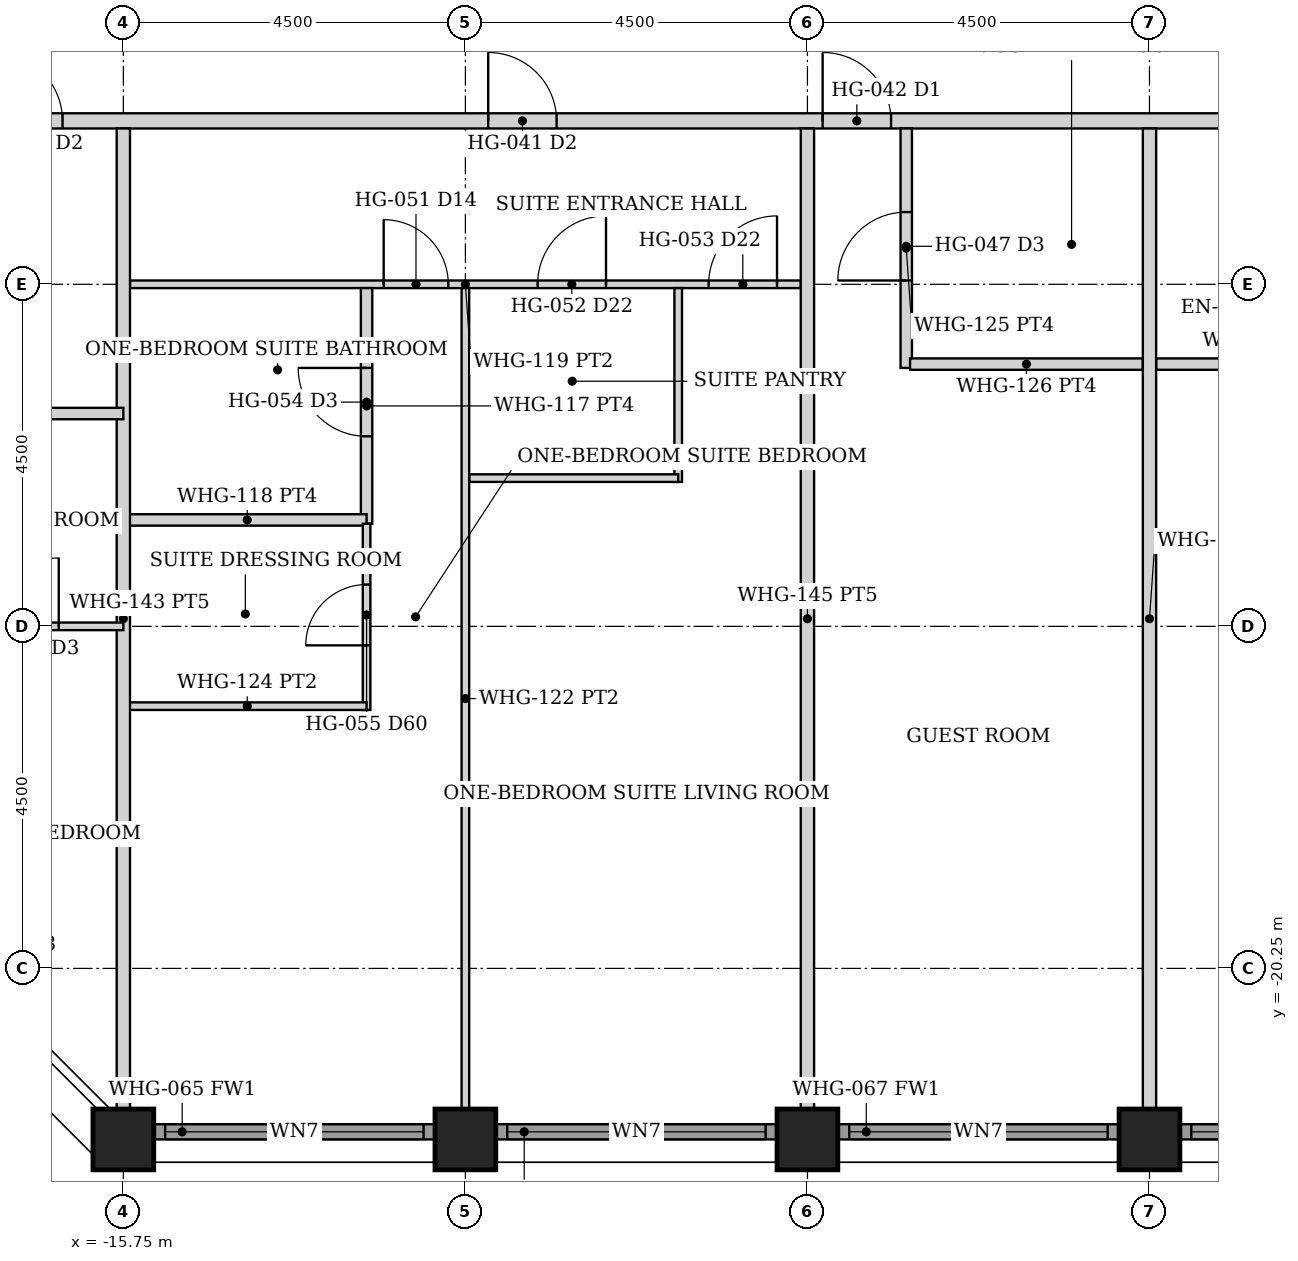
"""IFC4 building model, lengths in metres.
Left out: names, types, materials, properties, quantities, classifications, styles, units other than length and angle.
Written with IfcOpenShell. Run it as: python <this file> out.ifc"""

import sys

from ifc_helpers import new_model, si_unit, direction, frame, frame_2d, origin, origin_2d, place, context, subcontext, project, spatial, rectangle, hollow_rectangle, extrude, element, fill, save


model = new_model("IFC4")
c1 = context("Model", 3, precision=1e-05, world=origin(), true_north=direction((0.0, 1.0)))
c2 = subcontext(c1, "Body", "Model", "MODEL_VIEW")
j1 = project(units=[si_unit("LENGTHUNIT", "METRE"), si_unit("PLANEANGLEUNIT", "RADIAN")], contexts=[c1])
p1 = place(None, origin())
s1 = spatial("IfcSite", under=j1, at=p1, CompositionType="ELEMENT")
p2 = place(p1, origin())
s2 = spatial("IfcBuilding", under=s1, at=p2, CompositionType="ELEMENT")
p3 = place(p2, frame((0.0, 0.0, 186.8)))
s3 = spatial("IfcBuildingStorey", under=s2, at=p3, CompositionType="ELEMENT", Elevation=186.8)
for number, where, z_axis, x_axis in (
    (1, (-15.75, -22.5, 0.0), (0.0, 0.0, 1.0), (0.0, 1.0, 0.0)),
    (2, (-11.25, -22.5, 0.0), (0.0, 0.0, 1.0), (0.0, 1.0, 0.0)),
    (3, (-6.75, -22.5, 0.0), (0.0, 0.0, 1.0), (0.0, 1.0, 0.0)),
    (4, (-2.25, -22.5, 0.0), (0.0, 0.0, 1.0), (0.0, 1.0, 0.0)),
):
    element("IfcColumn", number, at=place(p3, frame(where, z_axis=z_axis, x_axis=x_axis)), inside=s3, PredefinedType="COLUMN", context=c2, shape_type="SweptSolid", body=[
        extrude(hollow_rectangle(XDim=0.8, YDim=0.8, WallThickness=0.045, at=origin_2d()), origin(), (0.0, 0.0, 1.0), 3.6),
    ])
p4 = place(p3, frame((-15.345, -22.4, 0.0), z_axis=(0.0, 0.0, 1.0), x_axis=(1.0, 0.0, 0.0)))
e5 = element("IfcWall", 5, at=p4, inside=s3, PredefinedType="SOLIDWALL", context=c2, shape_type="SweptSolid", body=[
    extrude(rectangle(XDim=3.69, YDim=0.2, at=frame_2d((1.845, 0.0))), origin(), (0.0, 0.0, 1.0), 2.379),
])
p5 = place(p4, frame((0.145, 0.0, 0.3)))
e6 = element("IfcOpeningElement", 6, at=p5, cuts=e5, PredefinedType="OPENING", context=c2, shape_type="SweptSolid", body=[
    extrude(rectangle(XDim=3.4, YDim=1.929, at=frame_2d((1.7, 0.964))), frame((0.0, 0.11, 0.0), z_axis=(0.0, -1.0, 0.0), x_axis=(1.0, 0.0, 0.0)), (0.0, 0.0, 1.0), 0.22),
])
p6 = place(p3, frame((-10.845, -22.4, 0.0), z_axis=(0.0, 0.0, 1.0), x_axis=(1.0, 0.0, 0.0)))
e7 = element("IfcWall", 7, at=p6, inside=s3, PredefinedType="SOLIDWALL", context=c2, shape_type="SweptSolid", body=[
    extrude(rectangle(XDim=3.69, YDim=0.2, at=frame_2d((1.845, 0.0))), origin(), (0.0, 0.0, 1.0), 2.379),
])
p7 = place(p6, frame((0.145, 0.0, 0.3)))
e8 = element("IfcOpeningElement", 8, at=p7, cuts=e7, PredefinedType="OPENING", context=c2, shape_type="SweptSolid", body=[
    extrude(rectangle(XDim=3.4, YDim=1.929, at=frame_2d((1.7, 0.964))), frame((0.0, 0.11, 0.0), z_axis=(0.0, -1.0, 0.0), x_axis=(1.0, 0.0, 0.0)), (0.0, 0.0, 1.0), 0.22),
])
p8 = place(p3, frame((-6.345, -22.4, 0.0), z_axis=(0.0, 0.0, 1.0), x_axis=(1.0, 0.0, 0.0)))
e9 = element("IfcWall", 9, at=p8, inside=s3, PredefinedType="SOLIDWALL", context=c2, shape_type="SweptSolid", body=[
    extrude(rectangle(XDim=3.69, YDim=0.2, at=frame_2d((1.845, 0.0))), origin(), (0.0, 0.0, 1.0), 2.379),
])
p9 = place(p8, frame((0.145, 0.0, 0.3)))
e10 = element("IfcOpeningElement", 10, at=p9, cuts=e9, PredefinedType="OPENING", context=c2, shape_type="SweptSolid", body=[
    extrude(rectangle(XDim=3.4, YDim=1.929, at=frame_2d((1.7, 0.964))), frame((0.0, 0.11, 0.0), z_axis=(0.0, -1.0, 0.0), x_axis=(1.0, 0.0, 0.0)), (0.0, 0.0, 1.0), 0.22),
])
p10 = place(p3, frame((-1.845, -22.4, 0.0), z_axis=(0.0, 0.0, 1.0), x_axis=(1.0, 0.0, 0.0)))
e11 = element("IfcWall", 11, at=p10, inside=s3, PredefinedType="SOLIDWALL", context=c2, shape_type="SweptSolid", body=[
    extrude(rectangle(XDim=3.69, YDim=0.2, at=frame_2d((1.845, 0.0))), origin(), (0.0, 0.0, 1.0), 2.379),
])
p11 = place(p10, frame((0.145, 0.0, 0.3)))
e12 = element("IfcOpeningElement", 12, at=p11, cuts=e11, PredefinedType="OPENING", context=c2, shape_type="SweptSolid", body=[
    extrude(rectangle(XDim=3.4, YDim=1.929, at=frame_2d((1.7, 0.964))), frame((0.0, 0.11, 0.0), z_axis=(0.0, -1.0, 0.0), x_axis=(1.0, 0.0, 0.0)), (0.0, 0.0, 1.0), 0.22),
])
p12 = place(p3, frame((-22.3, -9.1, 0.0), z_axis=(0.0, 0.0, 1.0), x_axis=(1.0, 0.0, 0.0)))
e13 = element("IfcWall", 13, at=p12, inside=s3, PredefinedType="PARTITIONING", context=c2, shape_type="SweptSolid", body=[
    extrude(rectangle(XDim=44.6, YDim=0.2, at=frame_2d((22.3, 0.0))), origin(), (0.0, 0.0, 1.0), 2.379),
])
p13 = place(p12, frame((11.35, 0.0, 0.0)))
e14 = element("IfcOpeningElement", 14, at=p13, cuts=e13, PredefinedType="OPENING", context=c2, shape_type="SweptSolid", body=[
    extrude(rectangle(XDim=0.9, YDim=2.1, at=frame_2d((0.45, 1.05))), frame((0.0, 0.11, 0.0), z_axis=(0.0, -1.0, 0.0), x_axis=(1.0, 0.0, 0.0)), (0.0, 0.0, 1.0), 0.22),
])
p14 = place(p12, frame((15.75, 0.0, 0.0)))
e15 = element("IfcOpeningElement", 15, at=p14, cuts=e13, PredefinedType="OPENING", context=c2, shape_type="SweptSolid", body=[
    extrude(rectangle(XDim=0.9, YDim=2.1, at=frame_2d((0.45, 1.05))), frame((0.0, 0.11, 0.0), z_axis=(0.0, -1.0, 0.0), x_axis=(1.0, 0.0, 0.0)), (0.0, 0.0, 1.0), 0.22),
])
p15 = place(p12, frame((23.45, 0.0, 0.0)))
e16 = element("IfcOpeningElement", 16, at=p15, cuts=e13, PredefinedType="OPENING", context=c2, shape_type="SweptSolid", body=[
    extrude(rectangle(XDim=0.9, YDim=2.1, at=frame_2d((0.45, 1.05))), frame((0.0, 0.11, 0.0), z_axis=(0.0, -1.0, 0.0), x_axis=(1.0, 0.0, 0.0)), (0.0, 0.0, 1.0), 0.22),
])
p16 = place(p12, frame((24.75, 0.0, 0.0)))
e17 = element("IfcOpeningElement", 17, at=p16, cuts=e13, PredefinedType="OPENING", context=c2, shape_type="SweptSolid", body=[
    extrude(rectangle(XDim=0.9, YDim=2.1, at=frame_2d((0.45, 1.05))), frame((0.0, 0.11, 0.0), z_axis=(0.0, -1.0, 0.0), x_axis=(1.0, 0.0, 0.0)), (0.0, 0.0, 1.0), 0.22),
])
p17 = place(p12, frame((29.25, 0.0, 0.0)))
e18 = element("IfcOpeningElement", 18, at=p17, cuts=e13, PredefinedType="OPENING", context=c2, shape_type="SweptSolid", body=[
    extrude(rectangle(XDim=0.9, YDim=2.1, at=frame_2d((0.45, 1.05))), frame((0.0, 0.11, 0.0), z_axis=(0.0, -1.0, 0.0), x_axis=(1.0, 0.0, 0.0)), (0.0, 0.0, 1.0), 0.22),
])
p18 = place(p12, frame((38.85, 0.0, 0.0)))
e19 = element("IfcOpeningElement", 19, at=p18, cuts=e13, PredefinedType="OPENING", context=c2, shape_type="SweptSolid", body=[
    extrude(rectangle(XDim=0.9, YDim=2.1, at=frame_2d((0.45, 1.05))), frame((0.0, 0.11, 0.0), z_axis=(0.0, -1.0, 0.0), x_axis=(1.0, 0.0, 0.0)), (0.0, 0.0, 1.0), 0.22),
])
p19 = place(p12, frame((4.85, 0.0, 0.0)))
e20 = element("IfcOpeningElement", 20, at=p19, cuts=e13, PredefinedType="OPENING", context=c2, shape_type="SweptSolid", body=[
    extrude(rectangle(XDim=0.9, YDim=2.1, at=frame_2d((0.45, 1.05))), frame((0.0, 0.11, 0.0), z_axis=(0.0, -1.0, 0.0), x_axis=(1.0, 0.0, 0.0)), (0.0, 0.0, 1.0), 0.22),
])
p20 = place(p3, frame((-15.663, -11.25, 0.0), z_axis=(0.0, 0.0, 1.0), x_axis=(1.0, 0.0, 0.0)))
e21 = element("IfcWall", 21, at=p20, inside=s3, PredefinedType="PARTITIONING", context=c2, shape_type="SweptSolid", body=[
    extrude(rectangle(XDim=8.825, YDim=0.1, at=frame_2d((4.413, 0.0))), origin(), (0.0, 0.0, 1.0), 2.379),
])
p21 = place(p20, frame((5.363, 0.0, 0.0)))
e22 = element("IfcOpeningElement", 22, at=p21, cuts=e21, PredefinedType="OPENING", context=c2, shape_type="SweptSolid", body=[
    extrude(rectangle(XDim=0.9, YDim=2.1, at=frame_2d((0.45, 1.05))), frame((0.0, 0.06, 0.0), z_axis=(0.0, -1.0, 0.0), x_axis=(1.0, 0.0, 0.0)), (0.0, 0.0, 1.0), 0.12),
])
p22 = place(p20, frame((7.613, 0.0, 0.0)))
e23 = element("IfcOpeningElement", 23, at=p22, cuts=e21, PredefinedType="OPENING", context=c2, shape_type="SweptSolid", body=[
    extrude(rectangle(XDim=0.9, YDim=2.1, at=frame_2d((0.45, 1.05))), frame((0.0, 0.06, 0.0), z_axis=(0.0, -1.0, 0.0), x_axis=(1.0, 0.0, 0.0)), (0.0, 0.0, 1.0), 0.12),
])
p23 = place(p20, frame((3.337, 0.0, 0.0)))
e24 = element("IfcOpeningElement", 24, at=p23, cuts=e21, PredefinedType="OPENING", context=c2, shape_type="SweptSolid", body=[
    extrude(rectangle(XDim=0.85, YDim=2.1, at=frame_2d((0.425, 1.05))), frame((0.0, 0.06, 0.0), z_axis=(0.0, -1.0, 0.0), x_axis=(1.0, 0.0, 0.0)), (0.0, 0.0, 1.0), 0.12),
])
p24 = place(p3, frame((-8.45, -13.85, 0.0), z_axis=(0.0, 0.0, 1.0), x_axis=(0.0, 1.0, 0.0)))
e25 = element("IfcWall", 25, at=p24, inside=s3, PredefinedType="PARTITIONING", context=c2, shape_type="SweptSolid", body=[
    extrude(rectangle(XDim=2.55, YDim=0.1, at=frame_2d((1.275, 0.0))), origin(), (0.0, 0.0, 1.0), 2.379),
])
p25 = place(p3, frame((-11.2, -13.8, 0.0), z_axis=(0.0, 0.0, 1.0), x_axis=(1.0, 0.0, 0.0)))
e26 = element("IfcWall", 26, at=p25, inside=s3, PredefinedType="PARTITIONING", context=c2, shape_type="SweptSolid", body=[
    extrude(rectangle(XDim=2.75, YDim=0.1, at=frame_2d((1.375, 0.0))), origin(), (0.0, 0.0, 1.0), 2.379),
])
p26 = place(p3, frame((-11.25, -22.1, 0.0), z_axis=(0.0, 0.0, 1.0), x_axis=(0.0, 1.0, 0.0)))
e27 = element("IfcWall", 27, at=p26, inside=s3, PredefinedType="PARTITIONING", context=c2, shape_type="SweptSolid", body=[
    extrude(rectangle(XDim=10.8, YDim=0.1, at=frame_2d((5.4, 0.0))), origin(), (0.0, 0.0, 1.0), 2.379),
])
p27 = place(p3, frame((-12.55, -14.4, 0.0), z_axis=(0.0, 0.0, 1.0), x_axis=(0.0, 1.0, 0.0)))
e28 = element("IfcWall", 28, at=p27, inside=s3, PredefinedType="PARTITIONING", context=c2, shape_type="SweptSolid", body=[
    extrude(rectangle(XDim=3.1, YDim=0.15, at=frame_2d((1.55, 0.0))), origin(), (0.0, 0.0, 1.0), 2.379),
])
p28 = place(p27, frame((1.15, 0.0, 0.0)))
e29 = element("IfcOpeningElement", 29, at=p28, cuts=e28, PredefinedType="OPENING", context=c2, shape_type="SweptSolid", body=[
    extrude(rectangle(XDim=0.9, YDim=2.1, at=frame_2d((0.45, 1.05))), frame((0.0, 0.085, 0.0), z_axis=(0.0, -1.0, 0.0), x_axis=(1.0, 0.0, 0.0)), (0.0, 0.0, 1.0), 0.17),
])
p29 = place(p3, frame((-15.69, -14.35, 0.0), z_axis=(0.0, 0.0, 1.0), x_axis=(1.0, 0.0, 0.0)))
e30 = element("IfcWall", 30, at=p29, inside=s3, PredefinedType="PARTITIONING", context=c2, shape_type="SweptSolid", body=[
    extrude(rectangle(XDim=3.14, YDim=0.15, at=frame_2d((1.57, 0.0))), origin(), (0.0, 0.0, 1.0), 2.379),
])
p30 = place(p3, frame((-12.55, -16.85, 0.0), z_axis=(0.0, 0.0, 1.0), x_axis=(0.0, 1.0, 0.0)))
e31 = element("IfcWall", 31, at=p30, inside=s3, PredefinedType="PARTITIONING", context=c2, shape_type="SweptSolid", body=[
    extrude(rectangle(XDim=2.45, YDim=0.1, at=frame_2d((1.225, 0.0))), origin(), (0.0, 0.0, 1.0), 2.379),
])
p31 = place(p30, frame((0.85, 0.0, 0.0)))
e32 = element("IfcOpeningElement", 32, at=p31, cuts=e31, PredefinedType="OPENING", context=c2, shape_type="SweptSolid", body=[
    extrude(rectangle(XDim=0.8, YDim=2.1, at=frame_2d((0.4, 1.05))), frame((0.0, 0.06, 0.0), z_axis=(0.0, -1.0, 0.0), x_axis=(1.0, 0.0, 0.0)), (0.0, 0.0, 1.0), 0.12),
])
p32 = place(p3, frame((-15.69, -16.8, 0.0), z_axis=(0.0, 0.0, 1.0), x_axis=(1.0, 0.0, 0.0)))
e33 = element("IfcWall", 33, at=p32, inside=s3, PredefinedType="PARTITIONING", context=c2, shape_type="SweptSolid", body=[
    extrude(rectangle(XDim=3.14, YDim=0.1, at=frame_2d((1.57, 0.0))), origin(), (0.0, 0.0, 1.0), 2.379),
])
p33 = place(p3, frame((-5.45, -12.35, 0.0), z_axis=(0.0, 0.0, 1.0), x_axis=(0.0, 1.0, 0.0)))
e34 = element("IfcWall", 34, at=p33, inside=s3, PredefinedType="PARTITIONING", context=c2, shape_type="SweptSolid", body=[
    extrude(rectangle(XDim=3.15, YDim=0.15, at=frame_2d((1.575, 0.0))), origin(), (0.0, 0.0, 1.0), 2.379),
])
p34 = place(p33, frame((1.15, 0.0, 0.0)))
e35 = element("IfcOpeningElement", 35, at=p34, cuts=e34, PredefinedType="OPENING", context=c2, shape_type="SweptSolid", body=[
    extrude(rectangle(XDim=0.9, YDim=2.1, at=frame_2d((0.45, 1.05))), frame((0.0, 0.085, 0.0), z_axis=(0.0, -1.0, 0.0), x_axis=(1.0, 0.0, 0.0)), (0.0, 0.0, 1.0), 0.17),
])
for number, where, z_axis, x_axis in (
    (36, (-5.4, -12.3, 0.0), (0.0, 0.0, 1.0), (1.0, 0.0, 0.0)),
    (37, (-2.163, -12.3, 0.0), (0.0, 0.0, 1.0), (1.0, 0.0, 0.0)),
):
    element("IfcWall", number, at=place(p3, frame(where, z_axis=z_axis, x_axis=x_axis)), inside=s3, PredefinedType="PARTITIONING", context=c2, shape_type="SweptSolid", body=[
        extrude(rectangle(XDim=3.062, YDim=0.15, at=frame_2d((1.531, 0.0))), origin(), (0.0, 0.0, 1.0), 2.379),
    ])
for number, where, z_axis, x_axis in (
    (38, (-15.75, -22.1, 0.0), (0.0, 0.0, 1.0), (0.0, 1.0, 0.0)),
    (39, (-6.75, -22.1, 0.0), (0.0, 0.0, 1.0), (0.0, 1.0, 0.0)),
    (40, (-2.25, -22.1, 0.0), (0.0, 0.0, 1.0), (0.0, 1.0, 0.0)),
):
    element("IfcWall", number, at=place(p3, frame(where, z_axis=z_axis, x_axis=x_axis)), inside=s3, PredefinedType="PARTITIONING", context=c2, shape_type="SweptSolid", body=[
        extrude(rectangle(XDim=12.9, YDim=0.175, at=frame_2d((6.45, 0.0))), origin(), (0.0, 0.0, 1.0), 2.379),
    ])
p35 = place(p3, frame((-22.1, -15.75, 0.0), z_axis=(0.0, 0.0, 1.0), x_axis=(1.0, 0.0, 0.0)))
e41 = element("IfcWall", 41, at=p35, inside=s3, PredefinedType="PARTITIONING", context=c2, shape_type="SweptSolid", body=[
    extrude(rectangle(XDim=6.35, YDim=0.1, at=frame_2d((3.175, 0.0))), origin(), (0.0, 0.0, 1.0), 2.379),
])
p36 = place(p35, frame((1.375, 0.0, 0.0)))
e42 = element("IfcOpeningElement", 42, at=p36, cuts=e41, PredefinedType="OPENING", context=c2, shape_type="SweptSolid", body=[
    extrude(rectangle(XDim=0.85, YDim=2.1, at=frame_2d((0.425, 1.05))), frame((0.0, 0.06, 0.0), z_axis=(0.0, -1.0, 0.0), x_axis=(1.0, 0.0, 0.0)), (0.0, 0.0, 1.0), 0.12),
])
p37 = place(p35, frame((4.6, 0.0, 0.0)))
e43 = element("IfcOpeningElement", 43, at=p37, cuts=e41, PredefinedType="OPENING", context=c2, shape_type="SweptSolid", body=[
    extrude(rectangle(XDim=0.9, YDim=2.1, at=frame_2d((0.45, 1.05))), frame((0.0, 0.06, 0.0), z_axis=(0.0, -1.0, 0.0), x_axis=(1.0, 0.0, 0.0)), (0.0, 0.0, 1.0), 0.12),
])
p38 = place(p3, frame((-18.55, -12.95, 0.0), z_axis=(0.0, 0.0, 1.0), x_axis=(1.0, 0.0, 0.0)))
e44 = element("IfcWall", 44, at=p38, inside=s3, PredefinedType="PARTITIONING", context=c2, shape_type="SweptSolid", body=[
    extrude(rectangle(XDim=2.8, YDim=0.15, at=frame_2d((1.4, 0.0))), origin(), (0.0, 0.0, 1.0), 2.379),
])
p39 = place(p5, origin())
e45 = element("IfcWindow", 45, at=p39, inside=s3, PartitioningType="SINGLE_PANEL", PredefinedType="WINDOW", context=c2, shape_type="SweptSolid", body=[
    extrude(rectangle(XDim=3.4, YDim=1.929, at=frame_2d((1.7, 0.964))), frame((0.0, 0.03, 0.0), z_axis=(0.0, -1.0, 0.0), x_axis=(1.0, 0.0, 0.0)), (0.0, 0.0, 1.0), 0.06),
])
fill(e6, e45)
p40 = place(p7, origin())
e46 = element("IfcWindow", 46, at=p40, inside=s3, PartitioningType="SINGLE_PANEL", PredefinedType="WINDOW", context=c2, shape_type="SweptSolid", body=[
    extrude(rectangle(XDim=3.4, YDim=1.929, at=frame_2d((1.7, 0.964))), frame((0.0, 0.03, 0.0), z_axis=(0.0, -1.0, 0.0), x_axis=(1.0, 0.0, 0.0)), (0.0, 0.0, 1.0), 0.06),
])
fill(e8, e46)
p41 = place(p9, origin())
e47 = element("IfcWindow", 47, at=p41, inside=s3, PartitioningType="SINGLE_PANEL", PredefinedType="WINDOW", context=c2, shape_type="SweptSolid", body=[
    extrude(rectangle(XDim=3.4, YDim=1.929, at=frame_2d((1.7, 0.964))), frame((0.0, 0.03, 0.0), z_axis=(0.0, -1.0, 0.0), x_axis=(1.0, 0.0, 0.0)), (0.0, 0.0, 1.0), 0.06),
])
fill(e10, e47)
p42 = place(p11, origin())
e48 = element("IfcWindow", 48, at=p42, inside=s3, PartitioningType="SINGLE_PANEL", PredefinedType="WINDOW", context=c2, shape_type="SweptSolid", body=[
    extrude(rectangle(XDim=3.4, YDim=1.929, at=frame_2d((1.7, 0.964))), frame((0.0, 0.03, 0.0), z_axis=(0.0, -1.0, 0.0), x_axis=(1.0, 0.0, 0.0)), (0.0, 0.0, 1.0), 0.06),
])
fill(e12, e48)
p43 = place(p13, origin())
e49 = element("IfcDoor", 49, at=p43, inside=s3, OperationType="SINGLE_SWING_LEFT", PredefinedType="DOOR", context=c2, shape_type="SweptSolid", body=[
    extrude(rectangle(XDim=0.9, YDim=2.1, at=frame_2d((0.45, 1.05))), frame((0.0, 0.025, 0.0), z_axis=(0.0, -1.0, 0.0), x_axis=(1.0, 0.0, 0.0)), (0.0, 0.0, 1.0), 0.05),
])
fill(e14, e49)
p44 = place(p21, origin())
e50 = element("IfcDoor", 50, at=p44, inside=s3, OperationType="SINGLE_SWING_RIGHT", PredefinedType="DOOR", context=c2, shape_type="SweptSolid", body=[
    extrude(rectangle(XDim=0.9, YDim=2.1, at=frame_2d((0.45, 1.05))), frame((0.0, 0.025, 0.0), z_axis=(0.0, -1.0, 0.0), x_axis=(1.0, 0.0, 0.0)), (0.0, 0.0, 1.0), 0.05),
])
fill(e22, e50)
p45 = place(p22, origin())
e51 = element("IfcDoor", 51, at=p45, inside=s3, OperationType="SINGLE_SWING_RIGHT", PredefinedType="DOOR", context=c2, shape_type="SweptSolid", body=[
    extrude(rectangle(XDim=0.9, YDim=2.1, at=frame_2d((0.45, 1.05))), frame((0.0, 0.025, 0.0), z_axis=(0.0, -1.0, 0.0), x_axis=(1.0, 0.0, 0.0)), (0.0, 0.0, 1.0), 0.05),
])
fill(e23, e51)
p46 = place(p23, origin())
e52 = element("IfcDoor", 52, at=p46, inside=s3, OperationType="SINGLE_SWING_LEFT", PredefinedType="DOOR", context=c2, shape_type="SweptSolid", body=[
    extrude(rectangle(XDim=0.85, YDim=2.1, at=frame_2d((0.425, 1.05))), frame((0.0, 0.025, 0.0), z_axis=(0.0, -1.0, 0.0), x_axis=(1.0, 0.0, 0.0)), (0.0, 0.0, 1.0), 0.05),
])
fill(e24, e52)
p47 = place(p28, origin())
e53 = element("IfcDoor", 53, at=p47, inside=s3, OperationType="SINGLE_SWING_RIGHT", PredefinedType="DOOR", context=c2, shape_type="SweptSolid", body=[
    extrude(rectangle(XDim=0.9, YDim=2.1, at=frame_2d((0.45, 1.05))), frame((0.0, 0.025, 0.0), z_axis=(0.0, -1.0, 0.0), x_axis=(1.0, 0.0, 0.0)), (0.0, 0.0, 1.0), 0.05),
])
fill(e29, e53)
p48 = place(p31, origin())
e54 = element("IfcDoor", 54, at=p48, inside=s3, OperationType="SINGLE_SWING_LEFT", PredefinedType="DOOR", context=c2, shape_type="SweptSolid", body=[
    extrude(rectangle(XDim=0.8, YDim=2.1, at=frame_2d((0.4, 1.05))), frame((0.0, 0.025, 0.0), z_axis=(0.0, -1.0, 0.0), x_axis=(1.0, 0.0, 0.0)), (0.0, 0.0, 1.0), 0.05),
])
fill(e32, e54)
p49 = place(p14, origin())
e55 = element("IfcDoor", 55, at=p49, inside=s3, OperationType="SINGLE_SWING_LEFT", PredefinedType="DOOR", context=c2, shape_type="SweptSolid", body=[
    extrude(rectangle(XDim=0.9, YDim=2.1, at=frame_2d((0.45, 1.05))), frame((0.0, 0.025, 0.0), z_axis=(0.0, -1.0, 0.0), x_axis=(1.0, 0.0, 0.0)), (0.0, 0.0, 1.0), 0.05),
])
fill(e15, e55)
p50 = place(p34, origin())
e56 = element("IfcDoor", 56, at=p50, inside=s3, OperationType="SINGLE_SWING_LEFT", PredefinedType="DOOR", context=c2, shape_type="SweptSolid", body=[
    extrude(rectangle(XDim=0.9, YDim=2.1, at=frame_2d((0.45, 1.05))), frame((0.0, 0.025, 0.0), z_axis=(0.0, -1.0, 0.0), x_axis=(1.0, 0.0, 0.0)), (0.0, 0.0, 1.0), 0.05),
])
fill(e35, e56)
p51 = place(p19, origin())
e57 = element("IfcDoor", 57, at=p51, inside=s3, OperationType="SINGLE_SWING_LEFT", PredefinedType="DOOR", context=c2, shape_type="SweptSolid", body=[
    extrude(rectangle(XDim=0.9, YDim=2.1, at=frame_2d((0.45, 1.05))), frame((0.0, 0.025, 0.0), z_axis=(0.0, -1.0, 0.0), x_axis=(1.0, 0.0, 0.0)), (0.0, 0.0, 1.0), 0.05),
])
fill(e20, e57)
p52 = place(p37, origin())
e58 = element("IfcDoor", 58, at=p52, inside=s3, OperationType="SINGLE_SWING_RIGHT", PredefinedType="DOOR", context=c2, shape_type="SweptSolid", body=[
    extrude(rectangle(XDim=0.9, YDim=2.1, at=frame_2d((0.45, 1.05))), frame((0.0, 0.025, 0.0), z_axis=(0.0, -1.0, 0.0), x_axis=(1.0, 0.0, 0.0)), (0.0, 0.0, 1.0), 0.05),
])
fill(e43, e58)
save(model, sys.argv[1])
